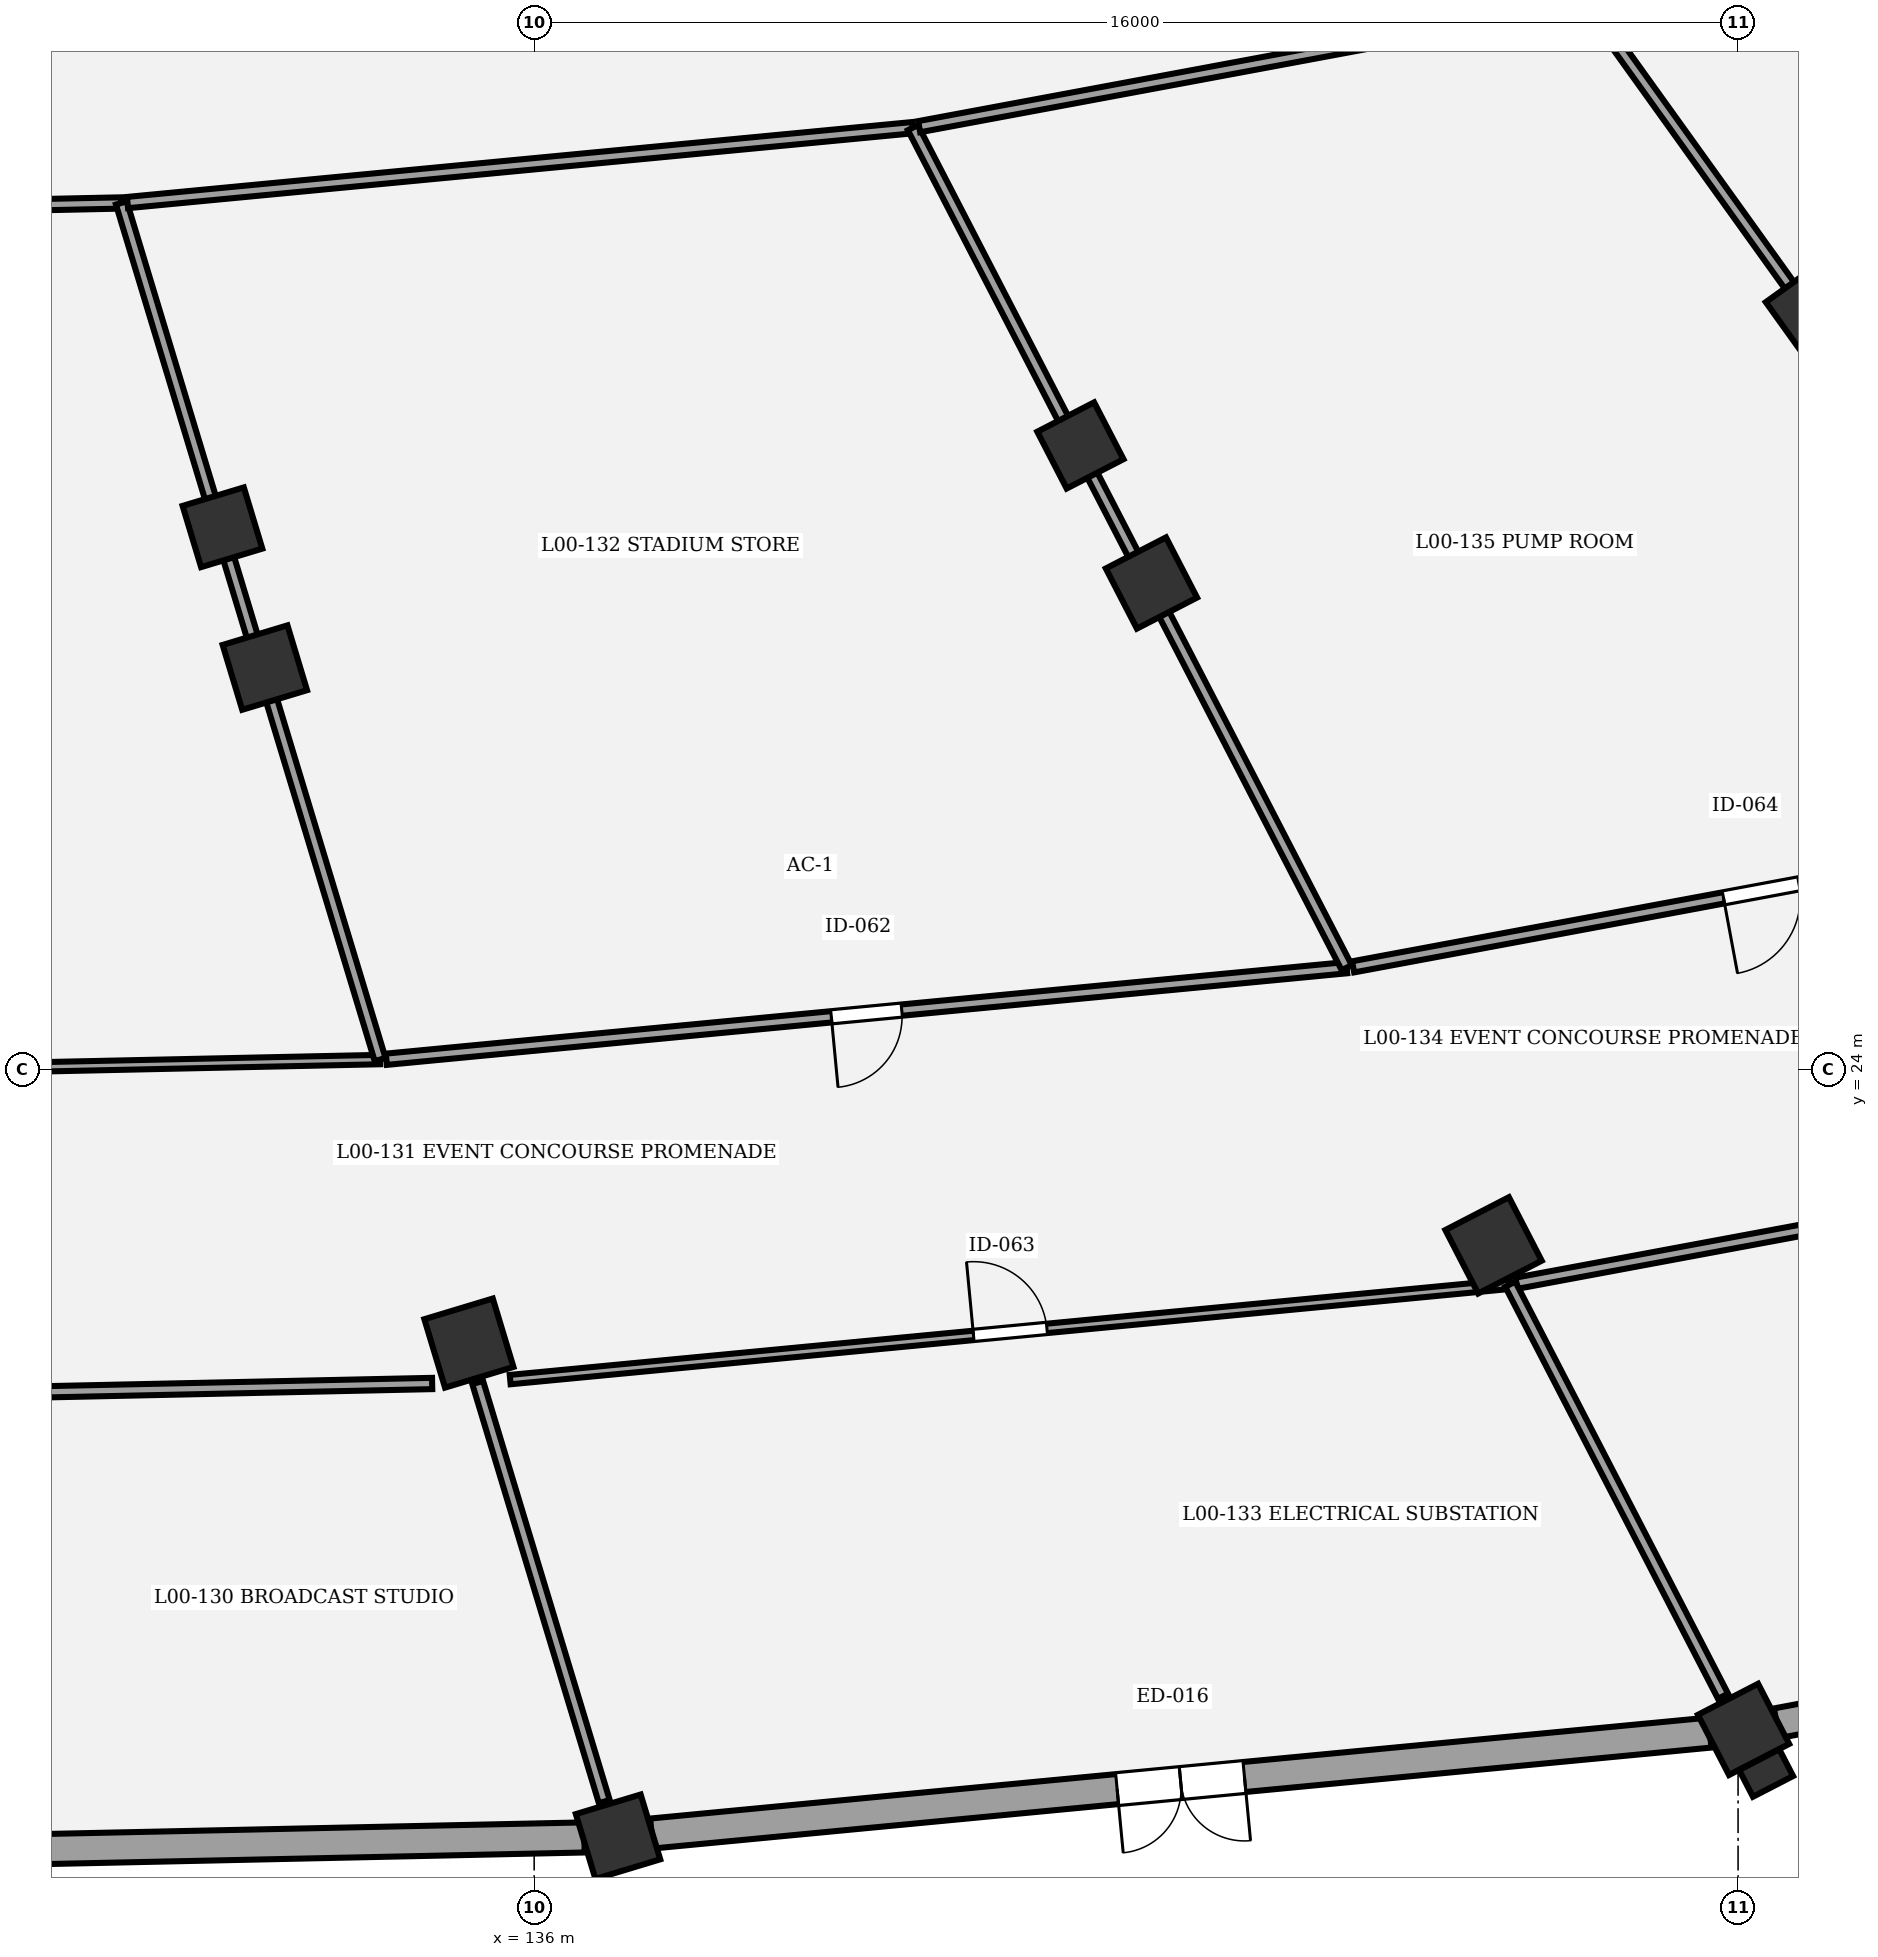
"""IFC4 building model, lengths in metres.
Left out: names, types, materials, properties, quantities, classifications, styles, units other than length and angle.
Written with IfcOpenShell. Run it as: python <this file> out.ifc"""

import sys

from ifc_helpers import new_model, si_unit, direction, frame, frame_2d, origin, origin_2d, place, context, subcontext, project, spatial, rectangle, extrude, element, fill, save


model = new_model("IFC4")
c1 = context("Model", 3, precision=1e-05, world=origin(), true_north=direction((0.0, 1.0)))
c2 = subcontext(c1, "Body", "Model", "MODEL_VIEW")
j1 = project(units=[si_unit("LENGTHUNIT", "METRE"), si_unit("PLANEANGLEUNIT", "RADIAN")], contexts=[c1])
p1 = place(None, origin())
s1 = spatial("IfcSite", under=j1, at=p1, CompositionType="ELEMENT")
p2 = place(p1, origin())
s2 = spatial("IfcBuilding", under=s1, at=p2, CompositionType="ELEMENT")
p3 = place(p2, origin())
s3 = spatial("IfcBuildingStorey", under=s2, at=p3, CompositionType="ELEMENT", Elevation=0.0)
p4 = place(p3, frame((131.857, 31.207, 0.0), z_axis=(0.0, 0.0, 1.0), x_axis=(0.289198876314, -0.957269037387, 0.0)))
e1 = element("IfcColumn", 1, at=p4, inside=s3, PredefinedType="COLUMN", context=c2, shape_type="SweptSolid", body=[
    extrude(rectangle(XDim=0.85, YDim=0.85, at=origin_2d()), origin(), (0.0, 0.0, 1.0), 5.4),
])
p5 = place(p3, frame((132.42, 29.343, 0.0), z_axis=(0.0, 0.0, 1.0), x_axis=(0.289198876314, -0.957269037387, 0.0)))
e2 = element("IfcColumn", 2, at=p5, inside=s3, PredefinedType="COLUMN", context=c2, shape_type="SweptSolid", body=[
    extrude(rectangle(XDim=0.9, YDim=0.9, at=origin_2d()), origin(), (0.0, 0.0, 1.0), 5.4),
])
p6 = place(p3, frame((135.133, 20.366, 0.0), z_axis=(0.0, 0.0, 1.0), x_axis=(0.289198876314, -0.957269037387, 0.0)))
e3 = element("IfcColumn", 3, at=p6, inside=s3, PredefinedType="COLUMN", context=c2, shape_type="SweptSolid", body=[
    extrude(rectangle(XDim=0.95, YDim=0.95, at=origin_2d()), origin(), (0.0, 0.0, 1.0), 5.4),
])
p7 = place(p3, frame((137.115, 13.806, 0.0), z_axis=(0.0, 0.0, 1.0), x_axis=(0.289198876314, -0.957269037387, 0.0)))
e4 = element("IfcColumn", 4, at=p7, inside=s3, PredefinedType="COLUMN", context=c2, shape_type="SweptSolid", body=[
    extrude(rectangle(XDim=0.9, YDim=0.9, at=origin_2d()), origin(), (0.0, 0.0, 1.0), 5.4),
])
p8 = place(p3, frame((143.259, 32.294, 0.0), z_axis=(0.0, 0.0, 1.0), x_axis=(0.458959712465, -0.888457079624, 0.0)))
e5 = element("IfcColumn", 5, at=p8, inside=s3, PredefinedType="COLUMN", context=c2, shape_type="SweptSolid", body=[
    extrude(rectangle(XDim=0.85, YDim=0.85, at=origin_2d()), origin(), (0.0, 0.0, 1.0), 5.4),
])
p9 = place(p3, frame((144.204, 30.466, 0.0), z_axis=(0.0, 0.0, 1.0), x_axis=(0.458959712465, -0.888457079624, 0.0)))
e6 = element("IfcColumn", 6, at=p9, inside=s3, PredefinedType="COLUMN", context=c2, shape_type="SweptSolid", body=[
    extrude(rectangle(XDim=0.9, YDim=0.9, at=origin_2d()), origin(), (0.0, 0.0, 1.0), 5.4),
])
p10 = place(p3, frame((148.75, 21.665, 0.0), z_axis=(0.0, 0.0, 1.0), x_axis=(0.458959712465, -0.888457079624, 0.0)))
e7 = element("IfcColumn", 7, at=p10, inside=s3, PredefinedType="COLUMN", context=c2, shape_type="SweptSolid", body=[
    extrude(rectangle(XDim=0.95, YDim=0.95, at=origin_2d()), origin(), (0.0, 0.0, 1.0), 5.4),
])
p11 = place(p3, frame((152.073, 15.233, 0.0), z_axis=(0.0, 0.0, 1.0), x_axis=(0.458959712465, -0.888457079624, 0.0)))
e8 = element("IfcColumn", 8, at=p11, inside=s3, PredefinedType="COLUMN", context=c2, shape_type="SweptSolid", body=[
    extrude(rectangle(XDim=0.9, YDim=0.9, at=origin_2d()), origin(), (0.0, 0.0, 1.0), 5.4),
])
p12 = place(p3, frame((152.373, 14.652, 0.0), z_axis=(0.0, 0.0, 1.0), x_axis=(0.888457079624, 0.458959712465, 0.0)))
e9 = element("IfcColumn", 9, at=p12, inside=s3, PredefinedType="PILASTER", context=c2, shape_type="SweptSolid", body=[
    extrude(rectangle(XDim=0.6, YDim=0.4, at=origin_2d()), origin(), (0.0, 0.0, 1.0), 5.4),
])
p13 = place(p3, frame((152.962, 34.101, 0.0), z_axis=(0.0, 0.0, 1.0), x_axis=(0.582974127943, -0.812490717577, 0.0)))
e10 = element("IfcColumn", 10, at=p13, inside=s3, PredefinedType="COLUMN", context=c2, shape_type="SweptSolid", body=[
    extrude(rectangle(XDim=0.85, YDim=0.85, at=origin_2d()), origin(), (0.0, 0.0, 1.0), 5.4),
])
p14 = place(p3, frame((136.667, 13.797, 0.0), z_axis=(0.0, 0.0, 1.0), x_axis=(-0.999768115817, -0.021534033422, 0.0)))
e11 = element("IfcWall", 11, at=p14, inside=s3, PredefinedType="STANDARD", context=c2, shape_type="SweptSolid", body=[
    extrude(rectangle(XDim=21.224, YDim=0.4, at=frame_2d((10.612, 0.0))), origin(), (0.0, 0.0, 1.0), 4.25),
])
p15 = place(p14, frame((9.812, 0.0, 0.0)))
e12 = element("IfcOpeningElement", 12, at=p15, cuts=e11, PredefinedType="OPENING", context=c2, shape_type="SweptSolid", body=[
    extrude(rectangle(XDim=1.6, YDim=2.3, at=frame_2d((0.8, 1.15))), frame((0.0, 0.21, 0.0), z_axis=(0.0, -1.0, 0.0), x_axis=(1.0, 0.0, 0.0)), (0.0, 0.0, 1.0), 0.42),
])
p16 = place(p3, frame((151.627, 15.19, 0.0), z_axis=(0.0, 0.0, 1.0), x_axis=(-0.995482650467, -0.094943628644, 0.0)))
e13 = element("IfcWall", 13, at=p16, inside=s3, PredefinedType="STANDARD", context=c2, shape_type="SweptSolid", body=[
    extrude(rectangle(XDim=14.13, YDim=0.4, at=frame_2d((7.065, 0.0))), origin(), (0.0, 0.0, 1.0), 4.25),
])
p17 = place(p16, frame((6.215, 0.0, 0.0)))
e14 = element("IfcOpeningElement", 14, at=p17, cuts=e13, PredefinedType="OPENING", context=c2, shape_type="SweptSolid", body=[
    extrude(rectangle(XDim=1.7, YDim=2.35, at=frame_2d((0.85, 1.175))), frame((0.0, 0.21, 0.0), z_axis=(0.0, -1.0, 0.0), x_axis=(1.0, 0.0, 0.0)), (0.0, 0.0, 1.0), 0.42),
])
p18 = place(p3, frame((164.361, 17.521, 0.0), z_axis=(0.0, 0.0, 1.0), x_axis=(-0.983098943476, -0.183075031985, 0.0)))
e15 = element("IfcWall", 15, at=p18, inside=s3, PredefinedType="STANDARD", context=c2, shape_type="SweptSolid", body=[
    extrude(rectangle(XDim=12.051, YDim=0.4, at=frame_2d((6.026, 0.0))), origin(), (0.0, 0.0, 1.0), 4.25),
])
p19 = place(p18, frame((5.126, 0.0, 0.0)))
e16 = element("IfcOpeningElement", 16, at=p19, cuts=e15, PredefinedType="OPENING", context=c2, shape_type="SweptSolid", body=[
    extrude(rectangle(XDim=1.8, YDim=2.4, at=frame_2d((0.9, 1.2))), frame((0.0, 0.21, 0.0), z_axis=(0.0, -1.0, 0.0), x_axis=(1.0, 0.0, 0.0)), (0.0, 0.0, 1.0), 0.42),
])
p20 = place(p3, frame((133.953, 24.134, 0.0), z_axis=(0.0, 0.0, 1.0), x_axis=(-0.999768266483, -0.021527037261, 0.0)))
e17 = element("IfcWall", 17, at=p20, inside=s3, PredefinedType="PARTITIONING", context=c2, shape_type="SweptSolid", body=[
    extrude(rectangle(XDim=18.917, YDim=0.125, at=frame_2d((9.458, 0.0))), origin(), (0.0, 0.0, 1.0), 4.15),
])
p21 = place(p20, frame((8.759, 0.0, 0.0)))
e18 = element("IfcOpeningElement", 18, at=p21, cuts=e17, PredefinedType="OPENING", context=c2, shape_type="SweptSolid", body=[
    extrude(rectangle(XDim=1.4, YDim=2.2, at=frame_2d((0.7, 1.1))), frame((0.0, 0.073, 0.0), z_axis=(0.0, -1.0, 0.0), x_axis=(1.0, 0.0, 0.0)), (0.0, 0.0, 1.0), 0.145),
])
p22 = place(p3, frame((115.511, 19.417, 0.0), z_axis=(0.0, 0.0, 1.0), x_axis=(0.999768107727, 0.021534409017, 0.0)))
e19 = element("IfcWall", 19, at=p22, inside=s3, PredefinedType="PARTITIONING", context=c2, shape_type="SweptSolid", body=[
    extrude(rectangle(XDim=19.137, YDim=0.15, at=frame_2d((9.569, 0.0))), origin(), (0.0, 0.0, 1.0), 4.15),
])
p23 = place(p22, frame((9.119, 0.0, 0.0)))
e20 = element("IfcOpeningElement", 20, at=p23, cuts=e19, PredefinedType="OPENING", context=c2, shape_type="SweptSolid", body=[
    extrude(rectangle(XDim=0.9, YDim=2.3, at=frame_2d((0.45, 1.15))), frame((0.0, 0.085, 0.0), z_axis=(0.0, -1.0, 0.0), x_axis=(1.0, 0.0, 0.0)), (0.0, 0.0, 1.0), 0.17),
])
p24 = place(p3, frame((146.799, 25.355, 0.0), z_axis=(0.0, 0.0, 1.0), x_axis=(-0.995485111947, -0.094917816515, 0.0)))
e21 = element("IfcWall", 21, at=p24, inside=s3, PredefinedType="PARTITIONING", context=c2, shape_type="SweptSolid", body=[
    extrude(rectangle(XDim=12.822, YDim=0.15, at=frame_2d((6.411, 0.0))), origin(), (0.0, 0.0, 1.0), 4.15),
])
p25 = place(p24, frame((5.941, 0.0, 0.0)))
e22 = element("IfcOpeningElement", 22, at=p25, cuts=e21, PredefinedType="OPENING", context=c2, shape_type="SweptSolid", body=[
    extrude(rectangle(XDim=0.94, YDim=2.3, at=frame_2d((0.47, 1.15))), frame((0.0, 0.085, 0.0), z_axis=(0.0, -1.0, 0.0), x_axis=(1.0, 0.0, 0.0)), (0.0, 0.0, 1.0), 0.17),
])
p26 = place(p3, frame((135.681, 19.881, 0.0), z_axis=(0.0, 0.0, 1.0), x_axis=(0.995484535327, 0.094923863827, 0.0)))
e23 = element("IfcWall", 23, at=p26, inside=s3, PredefinedType="PARTITIONING", context=c2, shape_type="SweptSolid", body=[
    extrude(rectangle(XDim=13.351, YDim=0.125, at=frame_2d((6.676, 0.0))), origin(), (0.0, 0.0, 1.0), 4.15),
])
p27 = place(p26, frame((6.186, 0.0, 0.0)))
e24 = element("IfcOpeningElement", 24, at=p27, cuts=e23, PredefinedType="OPENING", context=c2, shape_type="SweptSolid", body=[
    extrude(rectangle(XDim=0.98, YDim=2.3, at=frame_2d((0.49, 1.15))), frame((0.0, 0.073, 0.0), z_axis=(0.0, -1.0, 0.0), x_axis=(1.0, 0.0, 0.0)), (0.0, 0.0, 1.0), 0.145),
])
p28 = place(p3, frame((157.732, 27.386, 0.0), z_axis=(0.0, 0.0, 1.0), x_axis=(-0.983097372707, -0.183083466695, 0.0)))
e25 = element("IfcWall", 25, at=p28, inside=s3, PredefinedType="PARTITIONING", context=c2, shape_type="SweptSolid", body=[
    extrude(rectangle(XDim=11.035, YDim=0.15, at=frame_2d((5.517, 0.0))), origin(), (0.0, 0.0, 1.0), 4.15),
])
p29 = place(p28, frame((5.007, 0.0, 0.0)))
e26 = element("IfcOpeningElement", 26, at=p29, cuts=e25, PredefinedType="OPENING", context=c2, shape_type="SweptSolid", body=[
    extrude(rectangle(XDim=1.02, YDim=2.3, at=frame_2d((0.51, 1.15))), frame((0.0, 0.085, 0.0), z_axis=(0.0, -1.0, 0.0), x_axis=(1.0, 0.0, 0.0)), (0.0, 0.0, 1.0), 0.17),
])
p30 = place(p3, frame((149.055, 21.161, 0.0), z_axis=(0.0, 0.0, 1.0), x_axis=(0.983095748229, 0.183092189385, 0.0)))
e27 = element("IfcWall", 27, at=p30, inside=s3, PredefinedType="PARTITIONING", context=c2, shape_type="SweptSolid", body=[
    extrude(rectangle(XDim=11.793, YDim=0.15, at=frame_2d((5.896, 0.0))), origin(), (0.0, 0.0, 1.0), 4.15),
])
p31 = place(p30, frame((5.366, 0.0, 0.0)))
e28 = element("IfcOpeningElement", 28, at=p31, cuts=e27, PredefinedType="OPENING", context=c2, shape_type="SweptSolid", body=[
    extrude(rectangle(XDim=1.06, YDim=2.3, at=frame_2d((0.53, 1.15))), frame((0.0, 0.085, 0.0), z_axis=(0.0, -1.0, 0.0), x_axis=(1.0, 0.0, 0.0)), (0.0, 0.0, 1.0), 0.17),
])
p32 = place(p3, frame((115.04, 35.183, 0.0), z_axis=(0.0, 0.0, 1.0), x_axis=(0.999768149952, 0.021532448558, 0.0)))
e29 = element("IfcWall", 29, at=p32, inside=s3, PredefinedType="PARTITIONING", context=c2, shape_type="SweptSolid", body=[
    extrude(rectangle(XDim=15.477, YDim=0.15, at=frame_2d((7.738, 0.0))), origin(), (0.0, 0.0, 1.0), 4.15),
])
p33 = place(p3, frame((130.513, 35.517, 0.0), z_axis=(0.0, 0.0, 1.0), x_axis=(0.289240317571, -0.957256516662, 0.0)))
e30 = element("IfcWall", 30, at=p33, inside=s3, PredefinedType="PARTITIONING", context=c2, shape_type="SweptSolid", body=[
    extrude(rectangle(XDim=11.891, YDim=0.15, at=frame_2d((5.946, 0.0))), origin(), (0.0, 0.0, 1.0), 4.15),
])
p34 = place(p3, frame((135.249, 19.842, 0.0), z_axis=(0.0, 0.0, 1.0), x_axis=(0.289195444178, -0.957270074256, 0.0)))
e31 = element("IfcWall", 31, at=p34, inside=s3, PredefinedType="PARTITIONING", context=c2, shape_type="SweptSolid", body=[
    extrude(rectangle(XDim=5.817, YDim=0.15, at=frame_2d((2.909, 0.0))), origin(), (0.0, 0.0, 1.0), 4.15),
])
p35 = place(p3, frame((130.595, 35.522, 0.0), z_axis=(0.0, 0.0, 1.0), x_axis=(0.99548363917, 0.094933261529, 0.0)))
e32 = element("IfcWall", 32, at=p35, inside=s3, PredefinedType="PARTITIONING", context=c2, shape_type="SweptSolid", body=[
    extrude(rectangle(XDim=10.485, YDim=0.15, at=frame_2d((5.242, 0.0))), origin(), (0.0, 0.0, 1.0), 4.15),
])
p36 = place(p3, frame((141.033, 36.517, 0.0), z_axis=(0.0, 0.0, 1.0), x_axis=(0.458958189589, -0.888457866311, 0.0)))
e33 = element("IfcWall", 33, at=p36, inside=s3, PredefinedType="PARTITIONING", context=c2, shape_type="SweptSolid", body=[
    extrude(rectangle(XDim=12.564, YDim=0.15, at=frame_2d((6.282, 0.0))), origin(), (0.0, 0.0, 1.0), 4.15),
])
p37 = place(p3, frame((148.972, 21.148, 0.0), z_axis=(0.0, 0.0, 1.0), x_axis=(0.45896480759, -0.888454447563, 0.0)))
e34 = element("IfcWall", 34, at=p37, inside=s3, PredefinedType="PARTITIONING", context=c2, shape_type="SweptSolid", body=[
    extrude(rectangle(XDim=6.163, YDim=0.15, at=frame_2d((3.081, 0.0))), origin(), (0.0, 0.0, 1.0), 4.15),
])
p38 = place(p3, frame((141.116, 36.53, 0.0), z_axis=(0.0, 0.0, 1.0), x_axis=(0.983094830755, 0.183097115603, 0.0)))
e35 = element("IfcWall", 35, at=p38, inside=s3, PredefinedType="PARTITIONING", context=c2, shape_type="SweptSolid", body=[
    extrude(rectangle(XDim=9.021, YDim=0.15, at=frame_2d((4.51, 0.0))), origin(), (0.0, 0.0, 1.0), 4.15),
])
p39 = place(p3, frame((149.984, 38.182, 0.0), z_axis=(0.0, 0.0, 1.0), x_axis=(0.583032067708, -0.812449141808, 0.0)))
e36 = element("IfcWall", 36, at=p39, inside=s3, PredefinedType="PARTITIONING", context=c2, shape_type="SweptSolid", body=[
    extrude(rectangle(XDim=13.288, YDim=0.15, at=frame_2d((6.644, 0.0))), origin(), (0.0, 0.0, 1.0), 4.15),
])
p40 = place(p3, frame((152.531, 12.775, 0.0), z_axis=(0.0, 0.0, 1.0), x_axis=(0.983094545276, 0.183098648406, 0.0)))
e37 = element("IfcWall", 37, at=p40, inside=s3, PredefinedType="PARTITIONING", context=c2, shape_type="SweptSolid", body=[
    extrude(rectangle(XDim=12.947, YDim=0.15, at=frame_2d((6.474, 0.0))), origin(), (0.0, 0.0, 1.0), 4.15),
])
p41 = place(p17, origin())
e38 = element("IfcDoor", 38, at=p41, inside=s3, OperationType="DOUBLE_DOOR_SINGLE_SWING", PredefinedType="DOOR", context=c2, shape_type="SweptSolid", body=[
    extrude(rectangle(XDim=1.7, YDim=2.35, at=frame_2d((0.85, 1.175))), frame((0.0, 0.025, 0.0), z_axis=(0.0, -1.0, 0.0), x_axis=(1.0, 0.0, 0.0)), (0.0, 0.0, 1.0), 0.05),
])
fill(e14, e38)
p42 = place(p25, origin())
e39 = element("IfcDoor", 39, at=p42, inside=s3, OperationType="SINGLE_SWING_RIGHT", PredefinedType="DOOR", context=c2, shape_type="SweptSolid", body=[
    extrude(rectangle(XDim=0.94, YDim=2.3, at=frame_2d((0.47, 1.15))), frame((0.0, 0.025, 0.0), z_axis=(0.0, -1.0, 0.0), x_axis=(1.0, 0.0, 0.0)), (0.0, 0.0, 1.0), 0.05),
])
fill(e22, e39)
p43 = place(p27, origin())
e40 = element("IfcDoor", 40, at=p43, inside=s3, OperationType="SINGLE_SWING_LEFT", PredefinedType="DOOR", context=c2, shape_type="SweptSolid", body=[
    extrude(rectangle(XDim=0.98, YDim=2.3, at=frame_2d((0.49, 1.15))), frame((0.0, 0.025, 0.0), z_axis=(0.0, -1.0, 0.0), x_axis=(1.0, 0.0, 0.0)), (0.0, 0.0, 1.0), 0.05),
])
fill(e24, e40)
p44 = place(p29, origin())
e41 = element("IfcDoor", 41, at=p44, inside=s3, OperationType="SINGLE_SWING_RIGHT", PredefinedType="DOOR", context=c2, shape_type="SweptSolid", body=[
    extrude(rectangle(XDim=1.02, YDim=2.3, at=frame_2d((0.51, 1.15))), frame((0.0, 0.025, 0.0), z_axis=(0.0, -1.0, 0.0), x_axis=(1.0, 0.0, 0.0)), (0.0, 0.0, 1.0), 0.05),
])
fill(e26, e41)
save(model, sys.argv[1])
